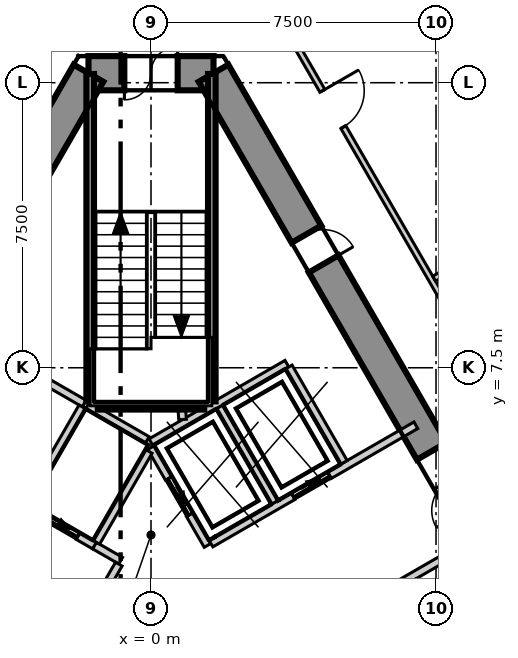
"""IFC4 building model, lengths in metres.
Left out: names, types, materials, properties, quantities, classifications, styles, units other than length and angle.
Written with IfcOpenShell. Run it as: python <this file> out.ifc"""

import sys

from ifc_helpers import new_model, si_unit, direction, frame, frame_2d, origin, place, context, subcontext, project, spatial, polyline, rectangle, outline, extrude, element, fill, save


model = new_model("IFC4")
c1 = context("Model", 3, precision=1e-05, world=origin(), true_north=direction((0.0, 1.0)))
c2 = subcontext(c1, "Body", "Model", "MODEL_VIEW")
j1 = project(units=[si_unit("LENGTHUNIT", "METRE"), si_unit("PLANEANGLEUNIT", "RADIAN")], contexts=[c1])
p1 = place(None, origin())
s1 = spatial("IfcSite", under=j1, at=p1, CompositionType="ELEMENT")
p2 = place(p1, origin())
s2 = spatial("IfcBuilding", under=s1, at=p2, CompositionType="ELEMENT")
p3 = place(p2, frame((0.0, 0.0, 35.3)))
s3 = spatial("IfcBuildingStorey", under=s2, at=p3, CompositionType="ELEMENT", Elevation=35.3)
p4 = place(p3, frame((1.645, 15.25, -0.3), z_axis=(0.0, 0.0, 1.0), x_axis=(-1.0, 0.0, 0.0)))
e1 = element("IfcWall", 1, at=p4, inside=s3, PredefinedType="SHEAR", context=c2, shape_type="SweptSolid", body=[
    extrude(outline(polyline([(-0.26, -0.45), (1.645, -0.45), (3.55, -0.45), (3.031, 0.45), (1.645, 0.45), (0.259, 0.45), (-0.26, -0.45)])), origin(), (0.0, 0.0, 1.0), 4.0),
])
p5 = place(p4, frame((0.945, 0.0, 0.3)))
e2 = element("IfcOpeningElement", 2, at=p5, cuts=e1, PredefinedType="OPENING", context=c2, shape_type="SweptSolid", body=[
    extrude(rectangle(XDim=1.4, YDim=2.1, at=frame_2d((0.7, 1.05))), frame((0.0, 0.46, 0.0), z_axis=(0.0, -1.0, 0.0), x_axis=(1.0, 0.0, 0.0)), (0.0, 0.0, 1.0), 0.92),
])
p6 = place(p3, frame((-1.645, 15.25, -0.3), z_axis=(0.0, 0.0, 1.0), x_axis=(-0.500026485275, -0.866010111964, 0.0)))
e3 = element("IfcWall", 3, at=p6, inside=s3, PredefinedType="SHEAR", context=c2, shape_type="SweptSolid", body=[
    extrude(outline(polyline([(-0.26, -0.45), (1.685, -0.45), (3.63, -0.45), (5.576, -0.45), (7.521, -0.45), (9.466, -0.449), (11.411, -0.449), (13.357, -0.449), (15.302, -0.449), (17.247, -0.449), (19.192, -0.449), (21.138, -0.449), (23.083, -0.449), (25.028, -0.449), (24.509, 0.45), (22.644, 0.45), (20.778, 0.45), (18.913, 0.45), (17.048, 0.45), (15.182, 0.449), (13.317, 0.449), (11.452, 0.449), (9.587, 0.449), (7.721, 0.449), (5.856, 0.449), (3.991, 0.449), (2.125, 0.449), (0.26, 0.449), (-0.26, -0.45)])), origin(), (0.0, 0.0, 1.0), 4.0),
])
p7 = place(p6, frame((11.834, 0.0, 0.3)))
e4 = element("IfcOpeningElement", 4, at=p7, cuts=e3, PredefinedType="OPENING", context=c2, shape_type="SweptSolid", body=[
    extrude(rectangle(XDim=1.1, YDim=2.1, at=frame_2d((0.55, 1.05))), frame((0.0, 0.46, 0.0), z_axis=(0.0, -1.0, 0.0), x_axis=(1.0, 0.0, 0.0)), (0.0, 0.0, 1.0), 0.92),
])
p8 = place(p6, frame((4.842, 0.0, 0.3)))
e5 = element("IfcOpeningElement", 5, at=p8, cuts=e3, PredefinedType="OPENING", context=c2, shape_type="SweptSolid", body=[
    extrude(rectangle(XDim=1.0, YDim=2.1, at=frame_2d((0.5, 1.05))), frame((0.0, 0.46, 0.0), z_axis=(0.0, -1.0, 0.0), x_axis=(1.0, 0.0, 0.0)), (0.0, 0.0, 1.0), 0.92),
])
p9 = place(p3, frame((14.03, -6.2, -0.3), z_axis=(0.0, 0.0, 1.0), x_axis=(-0.500026485275, 0.866010111964, 0.0)))
e6 = element("IfcWall", 6, at=p9, inside=s3, PredefinedType="SHEAR", context=c2, shape_type="SweptSolid", body=[
    extrude(outline(polyline([(-0.26, -0.449), (1.685, -0.449), (3.63, -0.449), (5.576, -0.449), (7.521, -0.449), (9.466, -0.449), (11.411, -0.449), (13.357, -0.449), (15.302, -0.449), (17.247, -0.45), (19.192, -0.45), (21.138, -0.45), (23.083, -0.45), (25.028, -0.45), (24.509, 0.449), (22.644, 0.449), (20.778, 0.449), (18.913, 0.449), (17.048, 0.449), (15.182, 0.449), (13.317, 0.449), (11.452, 0.449), (9.587, 0.449), (7.721, 0.45), (5.856, 0.45), (3.991, 0.45), (2.125, 0.45), (0.26, 0.45), (-0.26, -0.449)])), origin(), (0.0, 0.0, 1.0), 4.0),
])
p10 = place(p9, frame((11.484, 0.0, 0.3)))
e7 = element("IfcOpeningElement", 7, at=p10, cuts=e6, PredefinedType="OPENING", context=c2, shape_type="SweptSolid", body=[
    extrude(rectangle(XDim=1.8, YDim=2.1, at=frame_2d((0.9, 1.05))), frame((0.0, 0.46, 0.0), z_axis=(0.0, -1.0, 0.0), x_axis=(1.0, 0.0, 0.0)), (0.0, 0.0, 1.0), 0.92),
])
p11 = place(p9, frame((18.976, 0.0, 0.3)))
e8 = element("IfcOpeningElement", 8, at=p11, cuts=e6, PredefinedType="OPENING", context=c2, shape_type="SweptSolid", body=[
    extrude(rectangle(XDim=0.9, YDim=2.1, at=frame_2d((0.45, 1.05))), frame((0.0, 0.46, 0.0), z_axis=(0.0, -1.0, 0.0), x_axis=(1.0, 0.0, 0.0)), (0.0, 0.0, 1.0), 0.92),
])
p12 = place(p3, frame((35.163, -16.303, 0.0), z_axis=(0.0, 0.0, 1.0), x_axis=(-0.500012207976, 0.866018355391, 0.0)))
e9 = element("IfcWall", 9, at=p12, inside=s3, PredefinedType="ELEMENTEDWALL", context=c2, shape_type="SweptSolid", body=[
    extrude(rectangle(XDim=63.381, YDim=0.2, at=frame_2d((31.69, 0.0))), origin(), (0.0, 0.0, 1.0), 3.7),
])
p13 = place(p12, frame((2.302, 0.0, 0.9)))
e10 = element("IfcOpeningElement", 10, at=p13, cuts=e9, PredefinedType="OPENING", context=c2, shape_type="SweptSolid", body=[
    extrude(rectangle(XDim=5.6, YDim=2.5, at=frame_2d((2.8, 1.25))), frame((0.0, 0.11, 0.0), z_axis=(0.0, -1.0, 0.0), x_axis=(1.0, 0.0, 0.0)), (0.0, 0.0, 1.0), 0.22),
])
p14 = place(p12, frame((9.902, 0.0, 0.9)))
e11 = element("IfcOpeningElement", 11, at=p14, cuts=e9, PredefinedType="OPENING", context=c2, shape_type="SweptSolid", body=[
    extrude(rectangle(XDim=5.6, YDim=2.5, at=frame_2d((2.8, 1.25))), frame((0.0, 0.11, 0.0), z_axis=(0.0, -1.0, 0.0), x_axis=(1.0, 0.0, 0.0)), (0.0, 0.0, 1.0), 0.22),
])
p15 = place(p12, frame((17.501, 0.0, 0.9)))
e12 = element("IfcOpeningElement", 12, at=p15, cuts=e9, PredefinedType="OPENING", context=c2, shape_type="SweptSolid", body=[
    extrude(rectangle(XDim=5.6, YDim=2.5, at=frame_2d((2.8, 1.25))), frame((0.0, 0.11, 0.0), z_axis=(0.0, -1.0, 0.0), x_axis=(1.0, 0.0, 0.0)), (0.0, 0.0, 1.0), 0.22),
])
p16 = place(p12, frame((25.101, 0.0, 0.9)))
e13 = element("IfcOpeningElement", 13, at=p16, cuts=e9, PredefinedType="OPENING", context=c2, shape_type="SweptSolid", body=[
    extrude(rectangle(XDim=5.6, YDim=2.5, at=frame_2d((2.8, 1.25))), frame((0.0, 0.11, 0.0), z_axis=(0.0, -1.0, 0.0), x_axis=(1.0, 0.0, 0.0)), (0.0, 0.0, 1.0), 0.22),
])
p17 = place(p12, frame((32.7, 0.0, 0.9)))
e14 = element("IfcOpeningElement", 14, at=p17, cuts=e9, PredefinedType="OPENING", context=c2, shape_type="SweptSolid", body=[
    extrude(rectangle(XDim=5.6, YDim=2.5, at=frame_2d((2.8, 1.25))), frame((0.0, 0.11, 0.0), z_axis=(0.0, -1.0, 0.0), x_axis=(1.0, 0.0, 0.0)), (0.0, 0.0, 1.0), 0.22),
])
p18 = place(p12, frame((40.299, 0.0, 0.9)))
e15 = element("IfcOpeningElement", 15, at=p18, cuts=e9, PredefinedType="OPENING", context=c2, shape_type="SweptSolid", body=[
    extrude(rectangle(XDim=5.6, YDim=2.5, at=frame_2d((2.8, 1.25))), frame((0.0, 0.11, 0.0), z_axis=(0.0, -1.0, 0.0), x_axis=(1.0, 0.0, 0.0)), (0.0, 0.0, 1.0), 0.22),
])
p19 = place(p12, frame((47.899, 0.0, 0.9)))
e16 = element("IfcOpeningElement", 16, at=p19, cuts=e9, PredefinedType="OPENING", context=c2, shape_type="SweptSolid", body=[
    extrude(rectangle(XDim=5.6, YDim=2.5, at=frame_2d((2.8, 1.25))), frame((0.0, 0.11, 0.0), z_axis=(0.0, -1.0, 0.0), x_axis=(1.0, 0.0, 0.0)), (0.0, 0.0, 1.0), 0.22),
])
p20 = place(p12, frame((55.498, 0.0, 0.9)))
e17 = element("IfcOpeningElement", 17, at=p20, cuts=e9, PredefinedType="OPENING", context=c2, shape_type="SweptSolid", body=[
    extrude(rectangle(XDim=5.6, YDim=2.5, at=frame_2d((2.8, 1.25))), frame((0.0, 0.11, 0.0), z_axis=(0.0, -1.0, 0.0), x_axis=(1.0, 0.0, 0.0)), (0.0, 0.0, 1.0), 0.22),
])
p21 = place(p3, frame((-19.497, -11.17, 0.0), z_axis=(0.0, 0.0, 1.0), x_axis=(0.499998854553, 0.866026065108, 0.0)))
e18 = element("IfcWall", 18, at=p21, inside=s3, PredefinedType="PARTITIONING", context=c2, shape_type="SweptSolid", body=[
    extrude(rectangle(XDim=38.994, YDim=0.15, at=frame_2d((19.497, 0.0))), origin(), (0.0, 0.0, 1.0), 3.7),
])
p22 = place(p21, frame((36.244, 0.0, 0.0)))
e19 = element("IfcOpeningElement", 19, at=p22, cuts=e18, PredefinedType="OPENING", context=c2, shape_type="SweptSolid", body=[
    extrude(rectangle(XDim=1.1, YDim=2.1, at=frame_2d((0.55, 1.05))), frame((0.0, 0.085, 0.0), z_axis=(0.0, -1.0, 0.0), x_axis=(1.0, 0.0, 0.0)), (0.0, 0.0, 1.0), 0.17),
])
p23 = place(p21, frame((29.171, 0.0, 0.0)))
e20 = element("IfcOpeningElement", 20, at=p23, cuts=e18, PredefinedType="OPENING", context=c2, shape_type="SweptSolid", body=[
    extrude(rectangle(XDim=1.0, YDim=2.1, at=frame_2d((0.5, 1.05))), frame((0.0, 0.085, 0.0), z_axis=(0.0, -1.0, 0.0), x_axis=(1.0, 0.0, 0.0)), (0.0, 0.0, 1.0), 0.17),
])
p24 = place(p21, frame((32.971, 0.0, 0.0)))
e21 = element("IfcOpeningElement", 21, at=p24, cuts=e18, PredefinedType="OPENING", context=c2, shape_type="SweptSolid", body=[
    extrude(rectangle(XDim=0.9, YDim=2.1, at=frame_2d((0.45, 1.05))), frame((0.0, 0.085, 0.0), z_axis=(0.0, -1.0, 0.0), x_axis=(1.0, 0.0, 0.0)), (0.0, 0.0, 1.0), 0.17),
])
p25 = place(p21, frame((22.771, 0.0, 0.0)))
e22 = element("IfcOpeningElement", 22, at=p25, cuts=e18, PredefinedType="OPENING", context=c2, shape_type="SweptSolid", body=[
    extrude(rectangle(XDim=1.0, YDim=2.1, at=frame_2d((0.5, 1.05))), frame((0.0, 0.085, 0.0), z_axis=(0.0, -1.0, 0.0), x_axis=(1.0, 0.0, 0.0)), (0.0, 0.0, 1.0), 0.17),
])
p26 = place(p21, frame((6.872, 0.0, 0.0)))
e23 = element("IfcOpeningElement", 23, at=p26, cuts=e18, PredefinedType="OPENING", context=c2, shape_type="SweptSolid", body=[
    extrude(rectangle(XDim=1.1, YDim=2.1, at=frame_2d((0.55, 1.05))), frame((0.0, 0.085, 0.0), z_axis=(0.0, -1.0, 0.0), x_axis=(1.0, 0.0, 0.0)), (0.0, 0.0, 1.0), 0.17),
])
p27 = place(p21, frame((17.372, 0.0, 0.0)))
e24 = element("IfcOpeningElement", 24, at=p27, cuts=e18, PredefinedType="OPENING", context=c2, shape_type="SweptSolid", body=[
    extrude(rectangle(XDim=0.9, YDim=2.1, at=frame_2d((0.45, 1.05))), frame((0.0, 0.085, 0.0), z_axis=(0.0, -1.0, 0.0), x_axis=(1.0, 0.0, 0.0)), (0.0, 0.0, 1.0), 0.17),
])
p28 = place(p21, frame((14.172, 0.0, 0.0)))
e25 = element("IfcOpeningElement", 25, at=p28, cuts=e18, PredefinedType="OPENING", context=c2, shape_type="SweptSolid", body=[
    extrude(rectangle(XDim=0.9, YDim=2.1, at=frame_2d((0.45, 1.05))), frame((0.0, 0.085, 0.0), z_axis=(0.0, -1.0, 0.0), x_axis=(1.0, 0.0, 0.0)), (0.0, 0.0, 1.0), 0.17),
])
p29 = place(p21, frame((11.272, 0.0, 0.0)))
e26 = element("IfcOpeningElement", 26, at=p29, cuts=e18, PredefinedType="OPENING", context=c2, shape_type="SweptSolid", body=[
    extrude(rectangle(XDim=1.0, YDim=2.1, at=frame_2d((0.5, 1.05))), frame((0.0, 0.085, 0.0), z_axis=(0.0, -1.0, 0.0), x_axis=(1.0, 0.0, 0.0)), (0.0, 0.0, 1.0), 0.17),
])
p30 = place(p21, frame((1.473, 0.0, 0.0)))
e27 = element("IfcOpeningElement", 27, at=p30, cuts=e18, PredefinedType="OPENING", context=c2, shape_type="SweptSolid", body=[
    extrude(rectangle(XDim=1.1, YDim=2.1, at=frame_2d((0.55, 1.05))), frame((0.0, 0.085, 0.0), z_axis=(0.0, -1.0, 0.0), x_axis=(1.0, 0.0, 0.0)), (0.0, 0.0, 1.0), 0.17),
])
p31 = place(p3, frame((0.075, 22.47, 0.0), z_axis=(0.0, 0.0, 1.0), x_axis=(0.500002280369, -0.866024087209, 0.0)))
e28 = element("IfcWall", 28, at=p31, inside=s3, PredefinedType="PARTITIONING", context=c2, shape_type="SweptSolid", body=[
    extrude(rectangle(XDim=38.844, YDim=0.15, at=frame_2d((19.422, 0.0))), origin(), (0.0, 0.0, 1.0), 3.7),
])
p32 = place(p31, frame((36.244, 0.0, 0.0)))
e29 = element("IfcOpeningElement", 29, at=p32, cuts=e28, PredefinedType="OPENING", context=c2, shape_type="SweptSolid", body=[
    extrude(rectangle(XDim=1.1, YDim=2.1, at=frame_2d((0.55, 1.05))), frame((0.0, 0.085, 0.0), z_axis=(0.0, -1.0, 0.0), x_axis=(1.0, 0.0, 0.0)), (0.0, 0.0, 1.0), 0.17),
])
p33 = place(p31, frame((26.472, 0.0, 0.0)))
e30 = element("IfcOpeningElement", 30, at=p33, cuts=e28, PredefinedType="OPENING", context=c2, shape_type="SweptSolid", body=[
    extrude(rectangle(XDim=1.1, YDim=2.1, at=frame_2d((0.55, 1.05))), frame((0.0, 0.085, 0.0), z_axis=(0.0, -1.0, 0.0), x_axis=(1.0, 0.0, 0.0)), (0.0, 0.0, 1.0), 0.17),
])
p34 = place(p31, frame((8.872, 0.0, 0.0)))
e31 = element("IfcOpeningElement", 31, at=p34, cuts=e28, PredefinedType="OPENING", context=c2, shape_type="SweptSolid", body=[
    extrude(rectangle(XDim=1.1, YDim=2.1, at=frame_2d((0.55, 1.05))), frame((0.0, 0.085, 0.0), z_axis=(0.0, -1.0, 0.0), x_axis=(1.0, 0.0, 0.0)), (0.0, 0.0, 1.0), 0.17),
])
p35 = place(p31, frame((17.672, 0.0, 0.0)))
e32 = element("IfcOpeningElement", 32, at=p35, cuts=e28, PredefinedType="OPENING", context=c2, shape_type="SweptSolid", body=[
    extrude(rectangle(XDim=0.9, YDim=2.1, at=frame_2d((0.45, 1.05))), frame((0.0, 0.085, 0.0), z_axis=(0.0, -1.0, 0.0), x_axis=(1.0, 0.0, 0.0)), (0.0, 0.0, 1.0), 0.17),
])
p36 = place(p31, frame((15.272, 0.0, 0.0)))
e33 = element("IfcOpeningElement", 33, at=p36, cuts=e28, PredefinedType="OPENING", context=c2, shape_type="SweptSolid", body=[
    extrude(rectangle(XDim=0.9, YDim=2.1, at=frame_2d((0.45, 1.05))), frame((0.0, 0.085, 0.0), z_axis=(0.0, -1.0, 0.0), x_axis=(1.0, 0.0, 0.0)), (0.0, 0.0, 1.0), 0.17),
])
p37 = place(p31, frame((1.473, 0.0, 0.0)))
e34 = element("IfcOpeningElement", 34, at=p37, cuts=e28, PredefinedType="OPENING", context=c2, shape_type="SweptSolid", body=[
    extrude(rectangle(XDim=1.1, YDim=2.1, at=frame_2d((0.55, 1.05))), frame((0.0, 0.085, 0.0), z_axis=(0.0, -1.0, 0.0), x_axis=(1.0, 0.0, 0.0)), (0.0, 0.0, 1.0), 0.17),
])
p38 = place(p3, frame((7.451, 9.844, 0.0), z_axis=(0.0, 0.0, 1.0), x_axis=(0.866004402611, 0.500036373335, 0.0)))
e35 = element("IfcWall", 35, at=p38, inside=s3, PredefinedType="PARTITIONING", context=c2, shape_type="SweptSolid", body=[
    extrude(rectangle(XDim=2.85, YDim=0.15, at=frame_2d((1.425, 0.0))), origin(), (0.0, 0.0, 1.0), 3.7),
])
p39 = place(p3, frame((-0.002, 5.541, 0.0), z_axis=(0.0, 0.0, 1.0), x_axis=(0.86600155993, 0.500041296494, 0.0)))
e36 = element("IfcWall", 36, at=p39, inside=s3, PredefinedType="SOLIDWALL", context=c2, shape_type="SweptSolid", body=[
    extrude(rectangle(XDim=4.132, YDim=0.2, at=frame_2d((2.066, 0.0))), origin(), (0.0, 0.0, 1.0), 3.7),
])
p40 = place(p3, frame((0.0, 5.4, 0.0), z_axis=(0.0, 0.0, 1.0), x_axis=(0.500103862429, -0.865965430478, 0.0)))
e37 = element("IfcWall", 37, at=p40, inside=s3, PredefinedType="SOLIDWALL", context=c2, shape_type="SweptSolid", body=[
    extrude(rectangle(XDim=2.973, YDim=0.2, at=frame_2d((1.487, 0.0))), origin(), (0.0, 0.0, 1.0), 3.7),
])
p41 = place(p40, frame((0.937, 0.0, 0.0)))
e38 = element("IfcOpeningElement", 38, at=p41, cuts=e37, PredefinedType="OPENING", context=c2, shape_type="SweptSolid", body=[
    extrude(rectangle(XDim=1.1, YDim=2.1, at=frame_2d((0.55, 1.05))), frame((0.0, 0.11, 0.0), z_axis=(0.0, -1.0, 0.0), x_axis=(1.0, 0.0, 0.0)), (0.0, 0.0, 1.0), 0.22),
])
p42 = place(p3, frame((1.578, 2.874, 0.0), z_axis=(0.0, 0.0, 1.0), x_axis=(0.866031483044, 0.499989470266, 0.0)))
e39 = element("IfcWall", 39, at=p42, inside=s3, PredefinedType="SOLIDWALL", context=c2, shape_type="SweptSolid", body=[
    extrude(rectangle(XDim=6.226, YDim=0.2, at=frame_2d((3.113, 0.0))), origin(), (0.0, 0.0, 1.0), 3.7),
])
p43 = place(p42, frame((2.496, 0.0, 0.0)))
e40 = element("IfcOpeningElement", 40, at=p43, cuts=e39, PredefinedType="OPENING", context=c2, shape_type="SweptSolid", body=[
    extrude(rectangle(XDim=1.1, YDim=2.1, at=frame_2d((0.55, 1.05))), frame((0.0, 0.11, 0.0), z_axis=(0.0, -1.0, 0.0), x_axis=(1.0, 0.0, 0.0)), (0.0, 0.0, 1.0), 0.22),
])
p44 = place(p3, frame((3.278, -0.071, 0.0), z_axis=(0.0, 0.0, 1.0), x_axis=(0.865953757655, 0.500124074208, 0.0)))
e41 = element("IfcWall", 41, at=p44, inside=s3, PredefinedType="SOLIDWALL", context=c2, shape_type="SweptSolid", body=[
    extrude(rectangle(XDim=6.227, YDim=0.2, at=frame_2d((3.113, 0.0))), origin(), (0.0, 0.0, 1.0), 3.7),
])
for number, where, z_axis, x_axis in (
    (42, (3.626, 7.52, 0.0), (0.0, 0.0, 1.0), (0.5, -0.866, 0.0)),
    (43, (1.807, 6.47, 0.0), (0.0, 0.0, 1.0), (0.5, -0.866, 0.0)),
):
    element("IfcWall", number, at=place(p3, frame(where, z_axis=z_axis, x_axis=x_axis)), inside=s3, PredefinedType="SOLIDWALL", context=c2, shape_type="SweptSolid", body=[
        extrude(rectangle(XDim=2.9, YDim=0.2, at=frame_2d((1.45, 0.0))), origin(), (0.0, 0.0, 1.0), 3.7),
    ])
p45 = place(p3, frame((-1.488, 2.822, 0.0), z_axis=(0.0, 0.0, 1.0), x_axis=(0.866236612152, -0.499633997809, 0.0)))
e44 = element("IfcWall", 44, at=p45, inside=s3, PredefinedType="SOLIDWALL", context=c2, shape_type="SweptSolid", body=[
    extrude(rectangle(XDim=0.796, YDim=0.2, at=frame_2d((0.398, 0.0))), origin(), (0.0, 0.0, 1.0), 3.7),
])
p46 = place(p3, frame((-3.489, 7.557, 0.0), z_axis=(0.0, 0.0, 1.0), x_axis=(0.866010750942, -0.50002537861, 0.0)))
e45 = element("IfcWall", 45, at=p46, inside=s3, PredefinedType="SOLIDWALL", context=c2, shape_type="SweptSolid", body=[
    extrude(rectangle(XDim=2.0, YDim=0.2, at=frame_2d((1.0, 0.0))), origin(), (0.0, 0.0, 1.0), 3.7),
])
p47 = place(p3, frame((-2.444, -0.433, 0.0), z_axis=(0.0, 0.0, 1.0), x_axis=(0.500035624827, 0.866004834804, 0.0)))
e46 = element("IfcWall", 46, at=p47, inside=s3, PredefinedType="SOLIDWALL", context=c2, shape_type="SweptSolid", body=[
    extrude(rectangle(XDim=3.194, YDim=0.2, at=frame_2d((1.597, 0.0))), origin(), (0.0, 0.0, 1.0), 3.7),
])
p48 = place(p3, frame((-3.309, 3.873, 0.0), z_axis=(0.0, 0.0, 1.0), x_axis=(0.866098583652, -0.499873227325, 0.0)))
e47 = element("IfcWall", 47, at=p48, inside=s3, PredefinedType="SOLIDWALL", context=c2, shape_type="SweptSolid", body=[
    extrude(rectangle(XDim=2.103, YDim=0.2, at=frame_2d((1.051, 0.0))), origin(), (0.0, 0.0, 1.0), 3.7),
])
p49 = place(p48, frame((0.502, 0.0, 0.0)))
e48 = element("IfcOpeningElement", 48, at=p49, cuts=e47, PredefinedType="OPENING", context=c2, shape_type="SweptSolid", body=[
    extrude(rectangle(XDim=1.1, YDim=2.1, at=frame_2d((0.55, 1.05))), frame((0.0, 0.11, 0.0), z_axis=(0.0, -1.0, 0.0), x_axis=(1.0, 0.0, 0.0)), (0.0, 0.0, 1.0), 0.22),
])
p50 = place(p3, frame((-3.257, 3.959, 0.0), z_axis=(0.0, 0.0, 1.0), x_axis=(0.50012328804, 0.865954211699, 0.0)))
e49 = element("IfcWall", 49, at=p50, inside=s3, PredefinedType="SOLIDWALL", context=c2, shape_type="SweptSolid", body=[
    extrude(rectangle(XDim=2.9, YDim=0.2, at=frame_2d((1.45, 0.0))), origin(), (0.0, 0.0, 1.0), 3.7),
])
p51 = place(p3, frame((-1.67, 6.507, 0.0), z_axis=(0.0, 0.0, 1.0), x_axis=(0.865941441609, -0.500145398563, 0.0)))
e50 = element("IfcWall", 50, at=p51, inside=s3, PredefinedType="SOLIDWALL", context=c2, shape_type="SweptSolid", body=[
    extrude(rectangle(XDim=1.815, YDim=0.2, at=frame_2d((0.908, 0.0))), origin(), (0.0, 0.0, 1.0), 3.7),
])
p52 = place(p3, frame((-1.438, 2.909, 0.0), z_axis=(0.0, 0.0, 1.0), x_axis=(0.499829630636, 0.866123744241, 0.0)))
e51 = element("IfcWall", 51, at=p52, inside=s3, PredefinedType="SOLIDWALL", context=c2, shape_type="SweptSolid", body=[
    extrude(rectangle(XDim=2.761, YDim=0.2, at=frame_2d((1.38, 0.0))), origin(), (0.0, 0.0, 1.0), 3.7),
])
p53 = place(p3, frame((0.811, 6.4, 0.0), z_axis=(0.0, 0.0, 1.0), x_axis=(0.076199063602, -0.997092624938, 0.0)))
e52 = element("IfcWall", 52, at=p53, inside=s3, PredefinedType="SOLIDWALL", context=c2, shape_type="SweptSolid", body=[
    extrude(rectangle(XDim=0.263, YDim=0.2, at=frame_2d((0.131, 0.0))), origin(), (0.0, 0.0, 1.0), 3.7),
])
p54 = place(p3, frame((1.6, 6.615, 0.0), z_axis=(0.0, 0.0, 1.0), x_axis=(0.0, 1.0, 0.0)))
e53 = element("IfcWall", 53, at=p54, inside=s3, PredefinedType="SOLIDWALL", context=c2, shape_type="SweptSolid", body=[
    extrude(rectangle(XDim=8.615, YDim=0.2, at=frame_2d((4.308, 0.0))), origin(), (0.0, 0.0, 1.0), 3.7),
])
p55 = place(p3, frame((-1.4, 6.5, 0.0), z_axis=(0.0, 0.0, 1.0), x_axis=(1.0, 0.0, 0.0)))
e54 = element("IfcWall", 54, at=p55, inside=s3, PredefinedType="SOLIDWALL", context=c2, shape_type="SweptSolid", body=[
    extrude(rectangle(XDim=2.8, YDim=0.2, at=frame_2d((1.4, 0.0))), origin(), (0.0, 0.0, 1.0), 3.7),
])
p56 = place(p3, frame((-1.6, 6.615, 0.0), z_axis=(0.0, 0.0, 1.0), x_axis=(0.0, 1.0, 0.0)))
e55 = element("IfcWall", 55, at=p56, inside=s3, PredefinedType="SOLIDWALL", context=c2, shape_type="SweptSolid", body=[
    extrude(rectangle(XDim=8.615, YDim=0.2, at=frame_2d((4.308, 0.0))), origin(), (0.0, 0.0, 1.0), 3.7),
])
p57 = place(p41, origin())
e56 = element("IfcDoor", 56, at=p57, inside=s3, OperationType="SLIDING_TO_LEFT", PredefinedType="DOOR", context=c2, shape_type="SweptSolid", body=[
    extrude(rectangle(XDim=1.1, YDim=2.1, at=frame_2d((0.55, 1.05))), frame((0.0, 0.025, 0.0), z_axis=(0.0, -1.0, 0.0), x_axis=(1.0, 0.0, 0.0)), (0.0, 0.0, 1.0), 0.05),
])
fill(e38, e56)
p58 = place(p43, origin())
e57 = element("IfcDoor", 57, at=p58, inside=s3, OperationType="SLIDING_TO_LEFT", PredefinedType="DOOR", context=c2, shape_type="SweptSolid", body=[
    extrude(rectangle(XDim=1.1, YDim=2.1, at=frame_2d((0.55, 1.05))), frame((0.0, 0.025, 0.0), z_axis=(0.0, -1.0, 0.0), x_axis=(1.0, 0.0, 0.0)), (0.0, 0.0, 1.0), 0.05),
])
fill(e40, e57)
p59 = place(p49, origin())
e58 = element("IfcDoor", 58, at=p59, inside=s3, OperationType="SLIDING_TO_LEFT", PredefinedType="DOOR", context=c2, shape_type="SweptSolid", body=[
    extrude(rectangle(XDim=1.1, YDim=2.1, at=frame_2d((0.55, 1.05))), frame((0.0, 0.025, 0.0), z_axis=(0.0, -1.0, 0.0), x_axis=(1.0, 0.0, 0.0)), (0.0, 0.0, 1.0), 0.05),
])
fill(e48, e58)
p60 = place(p34, origin())
e59 = element("IfcDoor", 59, at=p60, inside=s3, OperationType="SINGLE_SWING_RIGHT", PredefinedType="DOOR", context=c2, shape_type="SweptSolid", body=[
    extrude(rectangle(XDim=1.1, YDim=2.1, at=frame_2d((0.55, 1.05))), frame((0.0, 0.025, 0.0), z_axis=(0.0, -1.0, 0.0), x_axis=(1.0, 0.0, 0.0)), (0.0, 0.0, 1.0), 0.05),
])
fill(e31, e59)
p61 = place(p10, origin())
e60 = element("IfcDoor", 60, at=p61, inside=s3, OperationType="DOUBLE_DOOR_SINGLE_SWING", PredefinedType="DOOR", context=c2, shape_type="SweptSolid", body=[
    extrude(rectangle(XDim=1.8, YDim=2.1, at=frame_2d((0.9, 1.05))), frame((0.0, 0.025, 0.0), z_axis=(0.0, -1.0, 0.0), x_axis=(1.0, 0.0, 0.0)), (0.0, 0.0, 1.0), 0.05),
])
fill(e7, e60)
p62 = place(p5, origin())
e61 = element("IfcDoor", 61, at=p62, inside=s3, OperationType="DOUBLE_DOOR_SINGLE_SWING", PredefinedType="DOOR", context=c2, shape_type="SweptSolid", body=[
    extrude(rectangle(XDim=1.4, YDim=2.1, at=frame_2d((0.7, 1.05))), frame((0.0, 0.025, 0.0), z_axis=(0.0, -1.0, 0.0), x_axis=(1.0, 0.0, 0.0)), (0.0, 0.0, 1.0), 0.05),
])
fill(e2, e61)
p63 = place(p11, origin())
e62 = element("IfcDoor", 62, at=p63, inside=s3, OperationType="SINGLE_SWING_LEFT", PredefinedType="DOOR", context=c2, shape_type="SweptSolid", body=[
    extrude(rectangle(XDim=0.9, YDim=2.1, at=frame_2d((0.45, 1.05))), frame((0.0, 0.025, 0.0), z_axis=(0.0, -1.0, 0.0), x_axis=(1.0, 0.0, 0.0)), (0.0, 0.0, 1.0), 0.05),
])
fill(e8, e62)
save(model, sys.argv[1])
